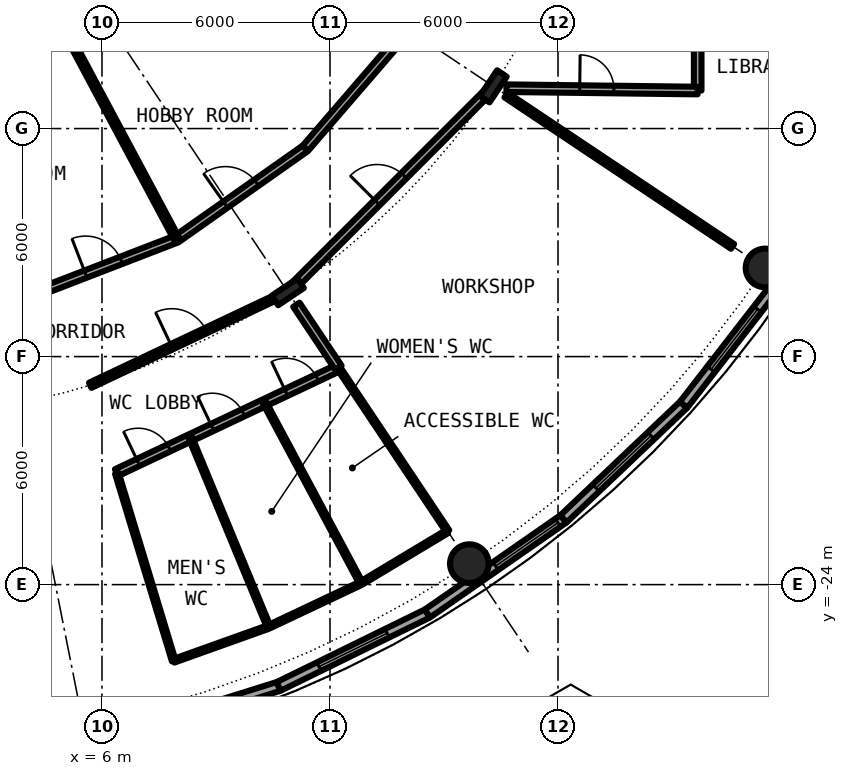
"""IFC4 building model, lengths in metres.
Left out: names, types, materials, properties, quantities, classifications, styles, units other than length and angle.
Written with IfcOpenShell. Run it as: python <this file> out.ifc"""

import sys

from ifc_helpers import new_model, si_unit, direction, frame, frame_2d, origin, origin_2d, place, context, subcontext, project, spatial, rectangle, hollow_circle, i_section, extrude, element, fill, save


model = new_model("IFC4")
c1 = context("Model", 3, precision=1e-05, world=origin(), true_north=direction((0.0, 1.0)))
c2 = subcontext(c1, "Body", "Model", "MODEL_VIEW")
j1 = project(units=[si_unit("LENGTHUNIT", "METRE"), si_unit("PLANEANGLEUNIT", "RADIAN")], contexts=[c1])
p1 = place(None, origin())
s1 = spatial("IfcSite", under=j1, at=p1, CompositionType="ELEMENT")
p2 = place(p1, origin())
s2 = spatial("IfcBuilding", under=s1, at=p2, CompositionType="ELEMENT")
p3 = place(p2, frame((0.0, 0.0, 14.1)))
s3 = spatial("IfcBuildingStorey", under=s2, at=p3, CompositionType="ELEMENT", Elevation=14.1)
for number, where, z_axis, x_axis in (
    (1, (15.667, -23.448, 0.0), (0.0, 0.0, 1.0), (1.0, 0.0, 0.0)),
    (2, (23.448, -15.667, 0.0), (0.0, 0.0, 1.0), (1.0, 0.0, 0.0)),
):
    element("IfcColumn", number, at=place(p3, frame(where, z_axis=z_axis, x_axis=x_axis)), inside=s3, PredefinedType="COLUMN", context=c2, shape_type="SweptSolid", body=[
        extrude(hollow_circle(Radius=0.508, WallThickness=0.05, at=origin_2d()), origin(), (0.0, 0.0, 1.0), 4.2),
    ])
for number, where, z_axis, x_axis in (
    (3, (10.889, -16.297, 0.0), (0.0, 0.0, 1.0), (0.556, -0.831, 0.0)),
    (4, (16.297, -10.889, 0.0), (0.0, 0.0, 1.0), (0.831, -0.556, 0.0)),
):
    element("IfcColumn", number, at=place(p3, frame(where, z_axis=z_axis, x_axis=x_axis)), inside=s3, PredefinedType="COLUMN", context=c2, shape_type="SweptSolid", body=[
        extrude(i_section(OverallWidth=0.303, OverallDepth=0.814, WebThickness=0.021, FlangeThickness=0.04, FilletRadius=0.03, at=origin_2d()), origin(), (0.0, 0.0, 1.0), 4.2),
    ])
p4 = place(p3, frame((6.489, -27.982, 0.0), z_axis=(0.0, 0.0, 1.0), x_axis=(0.954219534331, 0.299107138498, 0.0)))
e5 = element("IfcWall", 5, at=p4, inside=s3, PredefinedType="SOLIDWALL", context=c2, shape_type="SweptSolid", body=[
    extrude(rectangle(XDim=4.359, YDim=0.25, at=frame_2d((2.18, 0.0))), origin(), (0.0, 0.0, 1.0), 3.8),
])
p5 = place(p4, frame((1.18, 0.0, 0.9)))
e6 = element("IfcOpeningElement", 6, at=p5, cuts=e5, PredefinedType="OPENING", context=c2, shape_type="SweptSolid", body=[
    extrude(rectangle(XDim=2.0, YDim=2.4, at=frame_2d((1.0, 1.2))), frame((0.0, 0.135, 0.0), z_axis=(0.0, -1.0, 0.0), x_axis=(1.0, 0.0, 0.0)), (0.0, 0.0, 1.0), 0.27),
])
p6 = place(p3, frame((10.649, -26.678, 0.0), z_axis=(0.0, 0.0, 1.0), x_axis=(0.897938079481, 0.440121807478, 0.0)))
e7 = element("IfcWall", 7, at=p6, inside=s3, PredefinedType="SOLIDWALL", context=c2, shape_type="SweptSolid", body=[
    extrude(rectangle(XDim=4.36, YDim=0.25, at=frame_2d((2.18, 0.0))), origin(), (0.0, 0.0, 1.0), 3.8),
])
p7 = place(p6, frame((1.18, 0.0, 0.9)))
e8 = element("IfcOpeningElement", 8, at=p7, cuts=e7, PredefinedType="OPENING", context=c2, shape_type="SweptSolid", body=[
    extrude(rectangle(XDim=2.0, YDim=2.4, at=frame_2d((1.0, 1.2))), frame((0.0, 0.135, 0.0), z_axis=(0.0, -1.0, 0.0), x_axis=(1.0, 0.0, 0.0)), (0.0, 0.0, 1.0), 0.27),
])
p8 = place(p3, frame((14.564, -24.759, 0.0), z_axis=(0.0, 0.0, 1.0), x_axis=(0.820990800869, 0.57094141984, 0.0)))
e9 = element("IfcWall", 9, at=p8, inside=s3, PredefinedType="SOLIDWALL", context=c2, shape_type="SweptSolid", body=[
    extrude(rectangle(XDim=4.359, YDim=0.25, at=frame_2d((2.18, 0.0))), origin(), (0.0, 0.0, 1.0), 3.8),
])
p9 = place(p8, frame((2.183, 0.0, 0.9)))
e10 = element("IfcOpeningElement", 10, at=p9, cuts=e9, PredefinedType="OPENING", context=c2, shape_type="SweptSolid", body=[
    extrude(rectangle(XDim=2.0, YDim=2.4, at=frame_2d((1.0, 1.2))), frame((0.0, 0.135, 0.0), z_axis=(0.0, -1.0, 0.0), x_axis=(1.0, 0.0, 0.0)), (0.0, 0.0, 1.0), 0.27),
])
p10 = place(p3, frame((18.143, -22.27, 0.0), z_axis=(0.0, 0.0, 1.0), x_axis=(0.725101501119, 0.68864200647, 0.0)))
e11 = element("IfcWall", 11, at=p10, inside=s3, PredefinedType="SOLIDWALL", context=c2, shape_type="SweptSolid", body=[
    extrude(rectangle(XDim=4.359, YDim=0.25, at=frame_2d((2.18, 0.0))), origin(), (0.0, 0.0, 1.0), 3.8),
])
p11 = place(p10, frame((1.18, 0.0, 0.9)))
e12 = element("IfcOpeningElement", 12, at=p11, cuts=e11, PredefinedType="OPENING", context=c2, shape_type="SweptSolid", body=[
    extrude(rectangle(XDim=2.0, YDim=2.4, at=frame_2d((1.0, 1.2))), frame((0.0, 0.135, 0.0), z_axis=(0.0, -1.0, 0.0), x_axis=(1.0, 0.0, 0.0)), (0.0, 0.0, 1.0), 0.27),
])
p12 = place(p3, frame((21.304, -19.268, 0.0), z_axis=(0.0, 0.0, 1.0), x_axis=(0.612637256412, 0.790364214812, 0.0)))
e13 = element("IfcWall", 13, at=p12, inside=s3, PredefinedType="SOLIDWALL", context=c2, shape_type="SweptSolid", body=[
    extrude(rectangle(XDim=4.36, YDim=0.25, at=frame_2d((2.18, 0.0))), origin(), (0.0, 0.0, 1.0), 3.8),
])
p13 = place(p12, frame((1.18, 0.0, 0.9)))
e14 = element("IfcOpeningElement", 14, at=p13, cuts=e13, PredefinedType="OPENING", context=c2, shape_type="SweptSolid", body=[
    extrude(rectangle(XDim=2.0, YDim=2.4, at=frame_2d((1.0, 1.2))), frame((0.0, 0.135, 0.0), z_axis=(0.0, -1.0, 0.0), x_axis=(1.0, 0.0, 0.0)), (0.0, 0.0, 1.0), 0.27),
])
p14 = place(p3, frame((6.383, -21.054, 0.0), z_axis=(0.0, 0.0, 1.0), x_axis=(0.904110764787, 0.427298168726, 0.0)))
e15 = element("IfcWall", 15, at=p14, inside=s3, PredefinedType="PARTITIONING", context=c2, shape_type="SweptSolid", body=[
    extrude(rectangle(XDim=6.459, YDim=0.2, at=frame_2d((3.229, 0.0))), origin(), (0.0, 0.0, 1.0), 3.8),
])
p15 = place(p14, frame((0.629, 0.0, 0.0)))
e16 = element("IfcOpeningElement", 16, at=p15, cuts=e15, PredefinedType="OPENING", context=c2, shape_type="SweptSolid", body=[
    extrude(rectangle(XDim=0.9, YDim=2.3, at=frame_2d((0.45, 1.15))), frame((0.0, 0.11, 0.0), z_axis=(0.0, -1.0, 0.0), x_axis=(1.0, 0.0, 0.0)), (0.0, 0.0, 1.0), 0.22),
])
p16 = place(p14, frame((2.786, 0.0, 0.0)))
e17 = element("IfcOpeningElement", 17, at=p16, cuts=e15, PredefinedType="OPENING", context=c2, shape_type="SweptSolid", body=[
    extrude(rectangle(XDim=0.9, YDim=2.3, at=frame_2d((0.45, 1.15))), frame((0.0, 0.11, 0.0), z_axis=(0.0, -1.0, 0.0), x_axis=(1.0, 0.0, 0.0)), (0.0, 0.0, 1.0), 0.22),
])
p17 = place(p14, frame((4.936, 0.0, 0.0)))
e18 = element("IfcOpeningElement", 18, at=p17, cuts=e15, PredefinedType="OPENING", context=c2, shape_type="SweptSolid", body=[
    extrude(rectangle(XDim=0.9, YDim=2.3, at=frame_2d((0.45, 1.15))), frame((0.0, 0.11, 0.0), z_axis=(0.0, -1.0, 0.0), x_axis=(1.0, 0.0, 0.0)), (0.0, 0.0, 1.0), 0.22),
])
p18 = place(p3, frame((21.675, -11.0, 0.0), z_axis=(0.0, 0.0, 1.0), x_axis=(0.0, 1.0, 0.0)))
e19 = element("IfcWall", 19, at=p18, inside=s3, PredefinedType="PARTITIONING", context=c2, shape_type="SweptSolid", body=[
    extrude(rectangle(XDim=1.6, YDim=0.2, at=frame_2d((0.8, 0.0))), origin(), (0.0, 0.0, 1.0), 3.8),
])
p19 = place(p3, frame((5.69, -18.756, 0.0), z_axis=(0.0, 0.0, 1.0), x_axis=(0.903965018344, 0.42760641437, 0.0)))
e20 = element("IfcWall", 20, at=p19, inside=s3, PredefinedType="PARTITIONING", context=c2, shape_type="SweptSolid", body=[
    extrude(rectangle(XDim=5.599, YDim=0.15, at=frame_2d((2.799, 0.0))), origin(), (0.0, 0.0, 1.0), 3.38),
])
p20 = place(p19, frame((2.376, 0.0, 0.0)))
e21 = element("IfcOpeningElement", 21, at=p20, cuts=e20, PredefinedType="OPENING", context=c2, shape_type="SweptSolid", body=[
    extrude(rectangle(XDim=1.0, YDim=2.3, at=frame_2d((0.5, 1.15))), frame((0.0, 0.085, 0.0), z_axis=(0.0, -1.0, 0.0), x_axis=(1.0, 0.0, 0.0)), (0.0, 0.0, 1.0), 0.17),
])
p21 = place(p3, frame((10.998, -16.188, 0.0), z_axis=(0.0, 0.0, 1.0), x_axis=(0.707106781187, 0.707106781187, 0.0)))
e22 = element("IfcWall", 22, at=p21, inside=s3, PredefinedType="PARTITIONING", context=c2, shape_type="SweptSolid", body=[
    extrude(rectangle(XDim=7.34, YDim=0.2, at=frame_2d((3.67, 0.0))), origin(), (0.0, 0.0, 1.0), 3.38),
])
p22 = place(p21, frame((3.17, 0.0, 0.0)))
e23 = element("IfcOpeningElement", 23, at=p22, cuts=e22, PredefinedType="OPENING", context=c2, shape_type="SweptSolid", body=[
    extrude(rectangle(XDim=1.0, YDim=2.3, at=frame_2d((0.5, 1.15))), frame((0.0, 0.11, 0.0), z_axis=(0.0, -1.0, 0.0), x_axis=(1.0, 0.0, 0.0)), (0.0, 0.0, 1.0), 0.22),
])
p23 = place(p3, frame((4.106, -16.394, 0.0), z_axis=(0.0, 0.0, 1.0), x_axis=(0.932943640288, 0.360022449363, 0.0)))
e24 = element("IfcWall", 24, at=p23, inside=s3, PredefinedType="PARTITIONING", context=c2, shape_type="SweptSolid", body=[
    extrude(rectangle(XDim=4.139, YDim=0.2, at=frame_2d((2.069, 0.0))), origin(), (0.0, 0.0, 1.0), 3.8),
])
p24 = place(p23, frame((1.569, 0.0, 0.0)))
e25 = element("IfcOpeningElement", 25, at=p24, cuts=e24, PredefinedType="OPENING", context=c2, shape_type="SweptSolid", body=[
    extrude(rectangle(XDim=1.0, YDim=2.3, at=frame_2d((0.5, 1.15))), frame((0.0, 0.11, 0.0), z_axis=(0.0, -1.0, 0.0), x_axis=(1.0, 0.0, 0.0)), (0.0, 0.0, 1.0), 0.22),
])
p25 = place(p3, frame((7.967, -14.904, 0.0), z_axis=(0.0, 0.0, 1.0), x_axis=(0.817567680547, 0.575832517079, 0.0)))
e26 = element("IfcWall", 26, at=p25, inside=s3, PredefinedType="PARTITIONING", context=c2, shape_type="SweptSolid", body=[
    extrude(rectangle(XDim=4.137, YDim=0.2, at=frame_2d((2.068, 0.0))), origin(), (0.0, 0.0, 1.0), 3.8),
])
p26 = place(p25, frame((1.568, 0.0, 0.0)))
e27 = element("IfcOpeningElement", 27, at=p26, cuts=e26, PredefinedType="OPENING", context=c2, shape_type="SweptSolid", body=[
    extrude(rectangle(XDim=1.0, YDim=2.3, at=frame_2d((0.5, 1.15))), frame((0.0, 0.11, 0.0), z_axis=(0.0, -1.0, 0.0), x_axis=(1.0, 0.0, 0.0)), (0.0, 0.0, 1.0), 0.22),
])
p27 = place(p3, frame((11.349, -12.522, 0.0), z_axis=(0.0, 0.0, 1.0), x_axis=(0.653274518104, 0.757121129012, 0.0)))
e28 = element("IfcWall", 28, at=p27, inside=s3, PredefinedType="PARTITIONING", context=c2, shape_type="SweptSolid", body=[
    extrude(rectangle(XDim=4.124, YDim=0.2, at=frame_2d((2.062, 0.0))), origin(), (0.0, 0.0, 1.0), 3.8),
])
p28 = place(p3, frame((16.643, -10.938, 0.0), z_axis=(0.0, 0.0, 1.0), x_axis=(0.999924074118, -0.012322580895, 0.0)))
e29 = element("IfcWall", 29, at=p28, inside=s3, PredefinedType="PARTITIONING", context=c2, shape_type="SweptSolid", body=[
    extrude(rectangle(XDim=5.032, YDim=0.2, at=frame_2d((2.516, 0.0))), origin(), (0.0, 0.0, 1.0), 3.8),
])
p29 = place(p28, frame((1.928, 0.0, 0.0)))
e30 = element("IfcOpeningElement", 30, at=p29, cuts=e29, PredefinedType="OPENING", context=c2, shape_type="SweptSolid", body=[
    extrude(rectangle(XDim=0.9, YDim=2.3, at=frame_2d((0.45, 1.15))), frame((0.0, 0.11, 0.0), z_axis=(0.0, -1.0, 0.0), x_axis=(1.0, 0.0, 0.0)), (0.0, 0.0, 1.0), 0.22),
])
p30 = place(p3, frame((3.639, -6.808, 0.0), z_axis=(0.0, 0.0, 1.0), x_axis=(0.471460365694, -0.881887251059, 0.0)))
e31 = element("IfcWall", 31, at=p30, inside=s3, PredefinedType="PARTITIONING", context=c2, shape_type="SweptSolid", body=[
    extrude(rectangle(XDim=9.18, YDim=0.15, at=frame_2d((4.59, 0.0))), origin(), (0.0, 0.0, 1.0), 3.8),
])
p31 = place(p3, frame((8.327, -20.135, 0.0), z_axis=(0.0, 0.0, 1.0), x_axis=(0.38229040446, -0.924042232075, 0.0)))
e32 = element("IfcWall", 32, at=p31, inside=s3, PredefinedType="PARTITIONING", context=c2, shape_type="SweptSolid", body=[
    extrude(rectangle(XDim=5.386, YDim=0.1, at=frame_2d((2.693, 0.0))), origin(), (0.0, 0.0, 1.0), 3.8),
])
p32 = place(p3, frame((10.277, -19.212, 0.0), z_axis=(0.0, 0.0, 1.0), x_axis=(0.471698142177, -0.881760093601, 0.0)))
e33 = element("IfcWall", 33, at=p32, inside=s3, PredefinedType="PARTITIONING", context=c2, shape_type="SweptSolid", body=[
    extrude(rectangle(XDim=5.387, YDim=0.1, at=frame_2d((2.693, 0.0))), origin(), (0.0, 0.0, 1.0), 3.8),
])
p33 = place(p3, frame((11.115, -16.635, 0.0), z_axis=(0.0, 0.0, 1.0), x_axis=(0.555491592772, -0.831522152657, 0.0)))
e34 = element("IfcWall", 34, at=p33, inside=s3, PredefinedType="PARTITIONING", context=c2, shape_type="SweptSolid", body=[
    extrude(rectangle(XDim=1.993, YDim=0.2, at=frame_2d((0.996, 0.0))), origin(), (0.0, 0.0, 1.0), 3.8),
])
p34 = place(p3, frame((12.222, -18.292, 0.0), z_axis=(0.0, 0.0, 1.0), x_axis=(0.555549082229, -0.83148374442, 0.0)))
e35 = element("IfcWall", 35, at=p34, inside=s3, PredefinedType="PARTITIONING", context=c2, shape_type="SweptSolid", body=[
    extrude(rectangle(XDim=5.175, YDim=0.1, at=frame_2d((2.587, 0.0))), origin(), (0.0, 0.0, 1.0), 3.8),
])
p35 = place(p3, frame((16.633, -11.118, 0.0), z_axis=(0.0, 0.0, 1.0), x_axis=(0.831415754305, -0.555650828752, 0.0)))
e36 = element("IfcWall", 36, at=p35, inside=s3, PredefinedType="PARTITIONING", context=c2, shape_type="SweptSolid", body=[
    extrude(rectangle(XDim=7.168, YDim=0.15, at=frame_2d((3.584, 0.0))), origin(), (0.0, 0.0, 1.0), 3.8),
])
p36 = place(p3, frame((10.372, -25.117, 0.0), z_axis=(0.0, 0.0, 1.0), x_axis=(-0.941651844769, -0.336588477585, 0.0)))
e37 = element("IfcWall", 37, at=p36, inside=s3, PredefinedType="PARTITIONING", context=c2, shape_type="SweptSolid", body=[
    extrude(rectangle(XDim=2.638, YDim=0.1, at=frame_2d((1.319, 0.0))), origin(), (0.0, 0.0, 1.0), 3.8),
])
p37 = place(p3, frame((7.888, -26.005, 0.0), z_axis=(0.0, 0.0, 1.0), x_axis=(-0.290192738678, 0.956968220172, 0.0)))
e38 = element("IfcWall", 38, at=p37, inside=s3, PredefinedType="PARTITIONING", context=c2, shape_type="SweptSolid", body=[
    extrude(rectangle(XDim=5.155, YDim=0.1, at=frame_2d((2.577, 0.0))), origin(), (0.0, 0.0, 1.0), 3.8),
])
p38 = place(p3, frame((12.8, -23.971, 0.0), z_axis=(0.0, 0.0, 1.0), x_axis=(-0.904104040696, -0.427312395792, 0.0)))
e39 = element("IfcWall", 39, at=p38, inside=s3, PredefinedType="PARTITIONING", context=c2, shape_type="SweptSolid", body=[
    extrude(rectangle(XDim=2.645, YDim=0.1, at=frame_2d((1.322, 0.0))), origin(), (0.0, 0.0, 1.0), 3.8),
])
p39 = place(p3, frame((15.081, -22.605, 0.0), z_axis=(0.0, 0.0, 1.0), x_axis=(-0.857616279358, -0.514290110132, 0.0)))
e40 = element("IfcWall", 40, at=p39, inside=s3, PredefinedType="PARTITIONING", context=c2, shape_type="SweptSolid", body=[
    extrude(rectangle(XDim=2.619, YDim=0.1, at=frame_2d((1.31, 0.0))), origin(), (0.0, 0.0, 1.0), 3.8),
])
p40 = place(p7, origin())
e41 = element("IfcWindow", 41, at=p40, inside=s3, PartitioningType="SINGLE_PANEL", PredefinedType="WINDOW", context=c2, shape_type="SweptSolid", body=[
    extrude(rectangle(XDim=2.0, YDim=2.4, at=frame_2d((1.0, 1.2))), frame((0.0, 0.03, 0.0), z_axis=(0.0, -1.0, 0.0), x_axis=(1.0, 0.0, 0.0)), (0.0, 0.0, 1.0), 0.06),
])
fill(e8, e41)
p41 = place(p9, origin())
e42 = element("IfcWindow", 42, at=p41, inside=s3, PartitioningType="SINGLE_PANEL", PredefinedType="WINDOW", context=c2, shape_type="SweptSolid", body=[
    extrude(rectangle(XDim=2.0, YDim=2.4, at=frame_2d((1.0, 1.2))), frame((0.0, 0.03, 0.0), z_axis=(0.0, -1.0, 0.0), x_axis=(1.0, 0.0, 0.0)), (0.0, 0.0, 1.0), 0.06),
])
fill(e10, e42)
p42 = place(p11, origin())
e43 = element("IfcWindow", 43, at=p42, inside=s3, PartitioningType="SINGLE_PANEL", PredefinedType="WINDOW", context=c2, shape_type="SweptSolid", body=[
    extrude(rectangle(XDim=2.0, YDim=2.4, at=frame_2d((1.0, 1.2))), frame((0.0, 0.03, 0.0), z_axis=(0.0, -1.0, 0.0), x_axis=(1.0, 0.0, 0.0)), (0.0, 0.0, 1.0), 0.06),
])
fill(e12, e43)
p43 = place(p13, origin())
e44 = element("IfcWindow", 44, at=p43, inside=s3, PartitioningType="SINGLE_PANEL", PredefinedType="WINDOW", context=c2, shape_type="SweptSolid", body=[
    extrude(rectangle(XDim=2.0, YDim=2.4, at=frame_2d((1.0, 1.2))), frame((0.0, 0.03, 0.0), z_axis=(0.0, -1.0, 0.0), x_axis=(1.0, 0.0, 0.0)), (0.0, 0.0, 1.0), 0.06),
])
fill(e14, e44)
p44 = place(p20, origin())
e45 = element("IfcDoor", 45, at=p44, inside=s3, OperationType="SINGLE_SWING_RIGHT", PredefinedType="DOOR", context=c2, shape_type="SweptSolid", body=[
    extrude(rectangle(XDim=1.0, YDim=2.3, at=frame_2d((0.5, 1.15))), frame((0.0, 0.025, 0.0), z_axis=(0.0, -1.0, 0.0), x_axis=(1.0, 0.0, 0.0)), (0.0, 0.0, 1.0), 0.05),
])
fill(e21, e45)
p45 = place(p15, origin())
e46 = element("IfcDoor", 46, at=p45, inside=s3, OperationType="SINGLE_SWING_LEFT", PredefinedType="DOOR", context=c2, shape_type="SweptSolid", body=[
    extrude(rectangle(XDim=0.9, YDim=2.3, at=frame_2d((0.45, 1.15))), frame((0.0, 0.025, 0.0), z_axis=(0.0, -1.0, 0.0), x_axis=(1.0, 0.0, 0.0)), (0.0, 0.0, 1.0), 0.05),
])
fill(e16, e46)
p46 = place(p16, origin())
e47 = element("IfcDoor", 47, at=p46, inside=s3, OperationType="SINGLE_SWING_RIGHT", PredefinedType="DOOR", context=c2, shape_type="SweptSolid", body=[
    extrude(rectangle(XDim=0.9, YDim=2.3, at=frame_2d((0.45, 1.15))), frame((0.0, 0.025, 0.0), z_axis=(0.0, -1.0, 0.0), x_axis=(1.0, 0.0, 0.0)), (0.0, 0.0, 1.0), 0.05),
])
fill(e17, e47)
p47 = place(p17, origin())
e48 = element("IfcDoor", 48, at=p47, inside=s3, OperationType="SINGLE_SWING_RIGHT", PredefinedType="DOOR", context=c2, shape_type="SweptSolid", body=[
    extrude(rectangle(XDim=0.9, YDim=2.3, at=frame_2d((0.45, 1.15))), frame((0.0, 0.025, 0.0), z_axis=(0.0, -1.0, 0.0), x_axis=(1.0, 0.0, 0.0)), (0.0, 0.0, 1.0), 0.05),
])
fill(e18, e48)
p48 = place(p22, origin())
e49 = element("IfcDoor", 49, at=p48, inside=s3, OperationType="SINGLE_SWING_LEFT", PredefinedType="DOOR", context=c2, shape_type="SweptSolid", body=[
    extrude(rectangle(XDim=1.0, YDim=2.3, at=frame_2d((0.5, 1.15))), frame((0.0, 0.025, 0.0), z_axis=(0.0, -1.0, 0.0), x_axis=(1.0, 0.0, 0.0)), (0.0, 0.0, 1.0), 0.05),
])
fill(e23, e49)
p49 = place(p24, origin())
e50 = element("IfcDoor", 50, at=p49, inside=s3, OperationType="SINGLE_SWING_RIGHT", PredefinedType="DOOR", context=c2, shape_type="SweptSolid", body=[
    extrude(rectangle(XDim=1.0, YDim=2.3, at=frame_2d((0.5, 1.15))), frame((0.0, 0.025, 0.0), z_axis=(0.0, -1.0, 0.0), x_axis=(1.0, 0.0, 0.0)), (0.0, 0.0, 1.0), 0.05),
])
fill(e25, e50)
p50 = place(p26, origin())
e51 = element("IfcDoor", 51, at=p50, inside=s3, OperationType="SINGLE_SWING_RIGHT", PredefinedType="DOOR", context=c2, shape_type="SweptSolid", body=[
    extrude(rectangle(XDim=1.0, YDim=2.3, at=frame_2d((0.5, 1.15))), frame((0.0, 0.025, 0.0), z_axis=(0.0, -1.0, 0.0), x_axis=(1.0, 0.0, 0.0)), (0.0, 0.0, 1.0), 0.05),
])
fill(e27, e51)
p51 = place(p29, origin())
e52 = element("IfcDoor", 52, at=p51, inside=s3, OperationType="SINGLE_SWING_LEFT", PredefinedType="DOOR", context=c2, shape_type="SweptSolid", body=[
    extrude(rectangle(XDim=0.9, YDim=2.3, at=frame_2d((0.45, 1.15))), frame((0.0, 0.025, 0.0), z_axis=(0.0, -1.0, 0.0), x_axis=(1.0, 0.0, 0.0)), (0.0, 0.0, 1.0), 0.05),
])
fill(e30, e52)
save(model, sys.argv[1])
